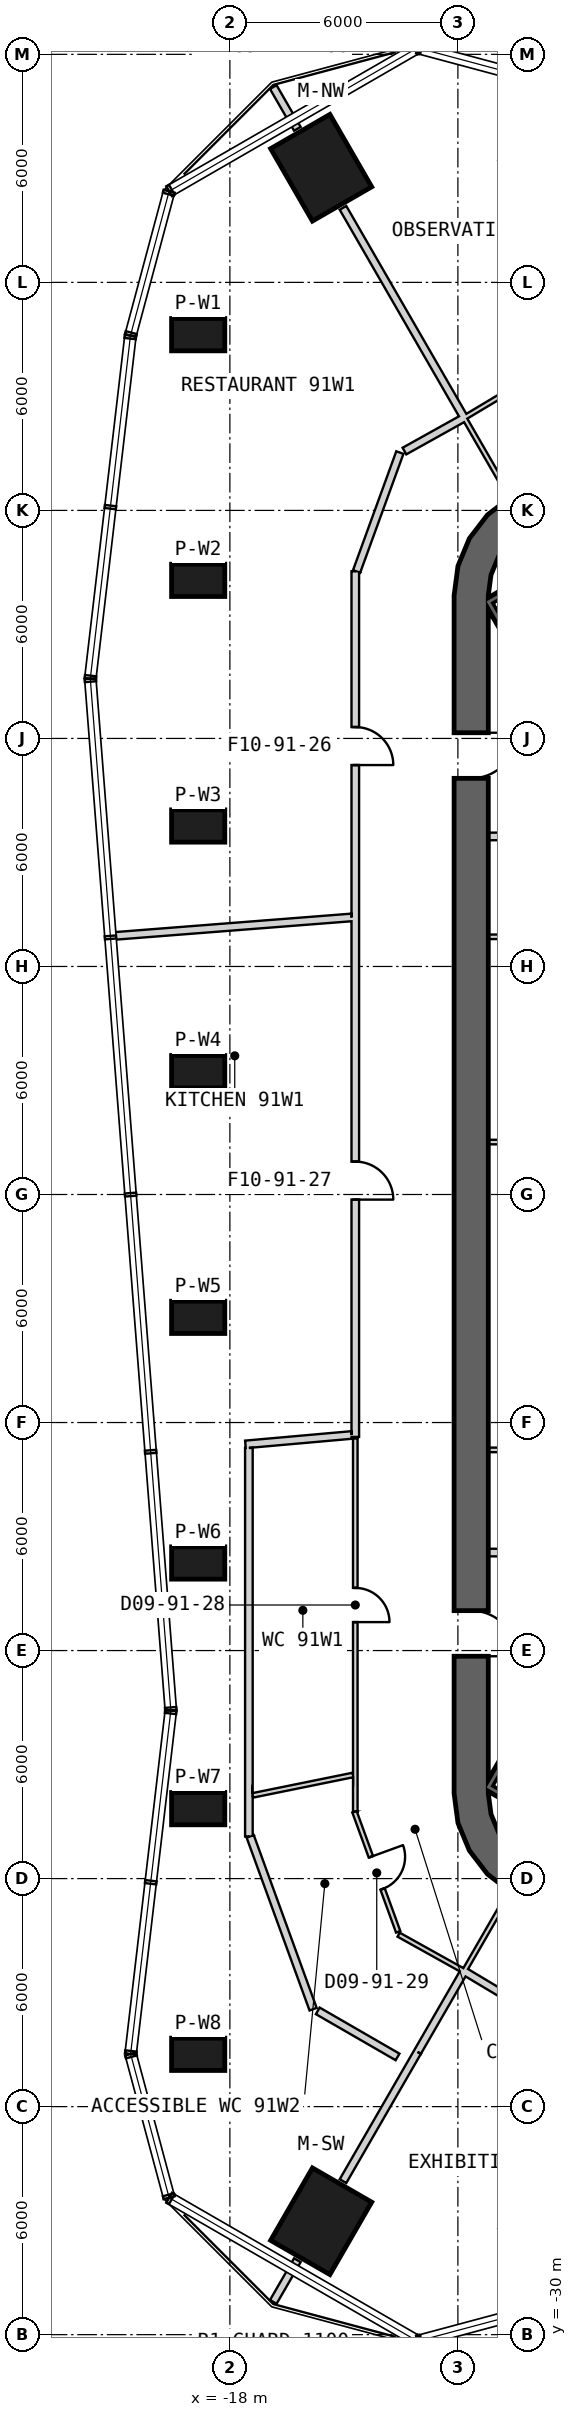
"""IFC4 building model, lengths in metres.
Left out: names, types, materials, properties, quantities, classifications, styles, units other than length and angle.
Written with IfcOpenShell. Run it as: python <this file> out.ifc"""

import sys

from ifc_helpers import new_model, si_unit, direction, frame, frame_2d, origin, origin_2d, place, context, subcontext, project, spatial, polyline, rectangle, outline, extrude, element, fill, save


model = new_model("IFC4")
c1 = context("Model", 3, precision=1e-05, world=origin(), true_north=direction((0.0, 1.0)))
c2 = subcontext(c1, "Body", "Model", "MODEL_VIEW")
j1 = project(units=[si_unit("LENGTHUNIT", "METRE"), si_unit("PLANEANGLEUNIT", "RADIAN")], contexts=[c1])
p1 = place(None, origin())
s1 = spatial("IfcSite", under=j1, at=p1, CompositionType="ELEMENT")
p2 = place(p1, origin())
s2 = spatial("IfcBuilding", under=s1, at=p2, CompositionType="ELEMENT")
p3 = place(p2, frame((0.0, 0.0, 398.3)))
s3 = spatial("IfcBuildingStorey", under=s2, at=p3, CompositionType="ELEMENT", Elevation=398.3)
for number, where, z_axis, x_axis in (
    (1, (-15.598, 27.016, 0.0), (0.0, 0.0, 1.0), (-0.5, 0.866, 0.0)),
    (2, (-15.598, -27.016, 0.0), (0.0, 0.0, 1.0), (-0.5, -0.866, 0.0)),
):
    element("IfcColumn", number, at=place(p3, frame(where, z_axis=z_axis, x_axis=x_axis)), inside=s3, PredefinedType="COLUMN", context=c2, shape_type="SweptSolid", body=[
        extrude(rectangle(XDim=2.2, YDim=1.8, at=origin_2d()), origin(), (0.0, 0.0, 1.0), 6.5),
    ])
for number, where, z_axis, x_axis in (
    (3, (-18.834, 22.624, 0.0), (0.0, 0.0, 1.0), (-1.0, 0.0, 0.0)),
    (4, (-18.834, 16.16, 0.0), (0.0, 0.0, 1.0), (-1.0, 0.0, 0.0)),
):
    element("IfcColumn", number, at=place(p3, frame(where, z_axis=z_axis, x_axis=x_axis)), inside=s3, PredefinedType="COLUMN", context=c2, shape_type="SweptSolid", body=[
        extrude(rectangle(XDim=1.4, YDim=0.85, at=origin_2d()), origin(), (0.0, 0.0, 1.0), 6.5),
    ])
for number, where, z_axis, x_axis in (
    (5, (-18.834, 9.696, -0.3), (0.0, 0.0, 1.0), (-1.0, 0.0, 0.0)),
    (6, (-18.834, 3.232, -0.3), (0.0, 0.0, 1.0), (-1.0, 0.0, 0.0)),
    (7, (-18.834, -3.232, -0.3), (0.0, 0.0, 1.0), (-1.0, 0.0, 0.0)),
    (8, (-18.834, -9.696, -0.3), (0.0, 0.0, 1.0), (-1.0, 0.0, 0.0)),
):
    element("IfcColumn", number, at=place(p3, frame(where, z_axis=z_axis, x_axis=x_axis)), inside=s3, PredefinedType="COLUMN", context=c2, shape_type="SweptSolid", body=[
        extrude(rectangle(XDim=1.4, YDim=0.85, at=origin_2d()), origin(), (0.0, 0.0, 1.0), 6.8),
    ])
for number, where, z_axis, x_axis in (
    (9, (-18.834, -16.16, 0.0), (0.0, 0.0, 1.0), (-1.0, 0.0, 0.0)),
    (10, (-18.834, -22.624, 0.0), (0.0, 0.0, 1.0), (-1.0, 0.0, 0.0)),
):
    element("IfcColumn", number, at=place(p3, frame(where, z_axis=z_axis, x_axis=x_axis)), inside=s3, PredefinedType="COLUMN", context=c2, shape_type="SweptSolid", body=[
        extrude(rectangle(XDim=1.4, YDim=0.85, at=origin_2d()), origin(), (0.0, 0.0, 1.0), 6.5),
    ])
p4 = place(p3, frame((-11.65, 15.762, 0.0), z_axis=(0.0, 0.0, 1.0), x_axis=(0.0, -1.0, 0.0)))
e11 = element("IfcWall", 11, at=p4, inside=s3, PredefinedType="SHEAR", context=c2, shape_type="SweptSolid", body=[
    extrude(rectangle(XDim=31.523, YDim=0.9, at=frame_2d((15.762, 0.0))), origin(), (0.0, 0.0, 1.0), 6.5),
])
p5 = place(p4, frame((3.612, 0.0, 0.0)))
e12 = element("IfcOpeningElement", 12, at=p5, cuts=e11, PredefinedType="OPENING", context=c2, shape_type="SweptSolid", body=[
    extrude(rectangle(XDim=1.2, YDim=2.4, at=frame_2d((0.6, 1.2))), frame((0.0, 0.46, 0.0), z_axis=(0.0, -1.0, 0.0), x_axis=(1.0, 0.0, 0.0)), (0.0, 0.0, 1.0), 0.92),
])
p6 = place(p4, frame((26.712, 0.0, 0.0)))
e13 = element("IfcOpeningElement", 13, at=p6, cuts=e11, PredefinedType="OPENING", context=c2, shape_type="SweptSolid", body=[
    extrude(rectangle(XDim=1.2, YDim=2.4, at=frame_2d((0.6, 1.2))), frame((0.0, 0.46, 0.0), z_axis=(0.0, -1.0, 0.0), x_axis=(1.0, 0.0, 0.0)), (0.0, 0.0, 1.0), 0.92),
])
p7 = place(p3, origin())
e14 = element("IfcWall", 14, at=p7, inside=s3, PredefinedType="SHEAR", context=c2, shape_type="SweptSolid", body=[
    extrude(outline(polyline([(-7.6, 18.36), (-8.323, 18.659), (-9.1, 18.762), (-9.876, 18.659), (-10.6, 18.36), (-11.221, 17.883), (-11.698, 17.262), (-11.998, 16.538), (-12.1, 15.762), (-11.2, 15.762), (-11.128, 16.305), (-10.919, 16.812), (-10.585, 17.247), (-10.15, 17.58), (-9.644, 17.79), (-9.1, 17.862), (-8.556, 17.79), (-8.05, 17.58), (-7.6, 18.36)])), origin(), (0.0, 0.0, 1.0), 6.5),
])
p8 = place(p3, origin())
e15 = element("IfcWall", 15, at=p8, inside=s3, PredefinedType="SHEAR", context=c2, shape_type="SweptSolid", body=[
    extrude(outline(polyline([(-12.1, -15.762), (-11.998, -16.538), (-11.698, -17.262), (-11.221, -17.883), (-10.6, -18.36), (-9.876, -18.659), (-9.1, -18.762), (-8.323, -18.659), (-7.6, -18.36), (-8.05, -17.58), (-8.556, -17.79), (-9.1, -17.862), (-9.644, -17.79), (-10.15, -17.58), (-10.585, -17.247), (-10.919, -16.812), (-11.128, -16.305), (-11.2, -15.762), (-12.1, -15.762)])), origin(), (0.0, 0.0, 1.0), 6.5),
])
p9 = place(p3, frame((-11.245, 15.678, -0.3), z_axis=(0.0, 0.0, 1.0), x_axis=(0.499977274689, -0.866038523851, 0.0)))
e16 = element("IfcWall", 16, at=p9, inside=s3, PredefinedType="SHEAR", context=c2, shape_type="SweptSolid", body=[
    extrude(rectangle(XDim=8.1, YDim=0.2, at=frame_2d((4.05, 0.0))), origin(), (0.0, 0.0, 1.0), 6.5),
])
for number, where, z_axis, x_axis in (
    (17, (-7.818, 17.541, -0.3), (0.0, 0.0, 1.0), (-0.866, -0.5, 0.0)),
    (18, (-11.282, -15.541, -0.3), (0.0, 0.0, 1.0), (0.866, -0.5, 0.0)),
):
    element("IfcWall", number, at=place(p3, frame(where, z_axis=z_axis, x_axis=x_axis)), inside=s3, PredefinedType="SHEAR", context=c2, shape_type="SweptSolid", body=[
        extrude(rectangle(XDim=3.8, YDim=0.2, at=frame_2d((1.9, 0.0))), origin(), (0.0, 0.0, 1.0), 6.5),
    ])
p10 = place(p3, frame((-7.196, -8.663, -0.3), z_axis=(0.0, 0.0, 1.0), x_axis=(-0.499997992926, -0.866026562566, 0.0)))
e19 = element("IfcWall", 19, at=p10, inside=s3, PredefinedType="SHEAR", context=c2, shape_type="SweptSolid", body=[
    extrude(rectangle(XDim=7.9, YDim=0.2, at=frame_2d((3.95, 0.0))), origin(), (0.0, 0.0, 1.0), 6.5),
])
p11 = place(p3, frame((-7.95, 6.78, 0.0), z_axis=(0.0, 0.0, 1.0), x_axis=(-1.0, 0.0, 0.0)))
e20 = element("IfcWall", 20, at=p11, inside=s3, PredefinedType="PARTITIONING", context=c2, shape_type="SweptSolid", body=[
    extrude(rectangle(XDim=3.25, YDim=0.12, at=frame_2d((1.625, 0.0))), origin(), (0.0, 0.0, 1.0), 6.2),
])
p12 = place(p11, frame((1.225, 0.0, 0.0)))
e21 = element("IfcOpeningElement", 21, at=p12, cuts=e20, PredefinedType="OPENING", context=c2, shape_type="SweptSolid", body=[
    extrude(rectangle(XDim=0.8, YDim=2.1, at=frame_2d((0.4, 1.05))), frame((0.0, 0.07, 0.0), z_axis=(0.0, -1.0, 0.0), x_axis=(1.0, 0.0, 0.0)), (0.0, 0.0, 1.0), 0.14),
])
p13 = place(p3, frame((-7.85, 9.451, 0.0), z_axis=(0.0, 0.0, 1.0), x_axis=(-0.999957167047, -0.009255488683, 0.0)))
e22 = element("IfcWall", 22, at=p13, inside=s3, PredefinedType="PARTITIONING", context=c2, shape_type="SweptSolid", body=[
    extrude(rectangle(XDim=3.35, YDim=0.2, at=frame_2d((1.675, 0.0))), origin(), (0.0, 0.0, 1.0), 6.2),
])
p14 = place(p13, frame((1.325, 0.0, 0.0)))
e23 = element("IfcOpeningElement", 23, at=p14, cuts=e22, PredefinedType="OPENING", context=c2, shape_type="SweptSolid", body=[
    extrude(rectangle(XDim=0.8, YDim=2.1, at=frame_2d((0.4, 1.05))), frame((0.0, 0.11, 0.0), z_axis=(0.0, -1.0, 0.0), x_axis=(1.0, 0.0, 0.0)), (0.0, 0.0, 1.0), 0.22),
])
p15 = place(p3, frame((-7.95, 1.38, 0.0), z_axis=(0.0, 0.0, 1.0), x_axis=(-1.0, 0.0, 0.0)))
e24 = element("IfcWall", 24, at=p15, inside=s3, PredefinedType="PARTITIONING", context=c2, shape_type="SweptSolid", body=[
    extrude(rectangle(XDim=3.25, YDim=0.12, at=frame_2d((1.625, 0.0))), origin(), (0.0, 0.0, 1.0), 6.2),
])
p16 = place(p3, frame((-11.2, -6.72, 0.0), z_axis=(0.0, 0.0, 1.0), x_axis=(1.0, 0.0, 0.0)))
e25 = element("IfcWall", 25, at=p16, inside=s3, PredefinedType="PARTITIONING", context=c2, shape_type="SweptSolid", body=[
    extrude(rectangle(XDim=3.25, YDim=0.12, at=frame_2d((1.625, 0.0))), origin(), (0.0, 0.0, 1.0), 6.2),
])
p17 = place(p16, frame((1.225, 0.0, 0.0)))
e26 = element("IfcOpeningElement", 26, at=p17, cuts=e25, PredefinedType="OPENING", context=c2, shape_type="SweptSolid", body=[
    extrude(rectangle(XDim=0.8, YDim=2.1, at=frame_2d((0.4, 1.05))), frame((0.0, 0.07, 0.0), z_axis=(0.0, -1.0, 0.0), x_axis=(1.0, 0.0, 0.0)), (0.0, 0.0, 1.0), 0.14),
])
p18 = place(p3, frame((-11.2, -9.42, 0.0), z_axis=(0.0, 0.0, 1.0), x_axis=(0.999957467379, -0.009222983926, 0.0)))
e27 = element("IfcWall", 27, at=p18, inside=s3, PredefinedType="PARTITIONING", context=c2, shape_type="SweptSolid", body=[
    extrude(rectangle(XDim=3.15, YDim=0.2, at=frame_2d((1.575, 0.0))), origin(), (0.0, 0.0, 1.0), 6.2),
])
p19 = place(p18, frame((1.175, 0.0, 0.0)))
e28 = element("IfcOpeningElement", 28, at=p19, cuts=e27, PredefinedType="OPENING", context=c2, shape_type="SweptSolid", body=[
    extrude(rectangle(XDim=0.8, YDim=2.1, at=frame_2d((0.4, 1.05))), frame((0.0, 0.11, 0.0), z_axis=(0.0, -1.0, 0.0), x_axis=(1.0, 0.0, 0.0)), (0.0, 0.0, 1.0), 0.22),
])
p20 = place(p3, frame((-14.7, 16.399, 0.0), z_axis=(0.0, 0.0, 1.0), x_axis=(0.0, -1.0, 0.0)))
e29 = element("IfcWall", 29, at=p20, inside=s3, PredefinedType="PARTITIONING", context=c2, shape_type="SweptSolid", body=[
    extrude(rectangle(XDim=9.078, YDim=0.2, at=frame_2d((4.539, 0.0))), origin(), (0.0, 0.0, 1.0), 5.57),
])
p21 = place(p20, frame((4.1, 0.0, 0.0)))
e30 = element("IfcOpeningElement", 30, at=p21, cuts=e29, PredefinedType="OPENING", context=c2, shape_type="SweptSolid", body=[
    extrude(rectangle(XDim=1.0, YDim=2.1, at=frame_2d((0.5, 1.05))), frame((0.0, 0.11, 0.0), z_axis=(0.0, -1.0, 0.0), x_axis=(1.0, 0.0, 0.0)), (0.0, 0.0, 1.0), 0.22),
])
p22 = place(p3, frame((-14.7, 7.322, 0.0), z_axis=(0.0, 0.0, 1.0), x_axis=(0.0, -1.0, 0.0)))
e31 = element("IfcWall", 31, at=p22, inside=s3, PredefinedType="PARTITIONING", context=c2, shape_type="SweptSolid", body=[
    extrude(rectangle(XDim=13.701, YDim=0.2, at=frame_2d((6.851, 0.0))), origin(), (0.0, 0.0, 1.0), 5.67),
])
p23 = place(p22, frame((6.456, 0.0, 0.0)))
e32 = element("IfcOpeningElement", 32, at=p23, cuts=e31, PredefinedType="OPENING", context=c2, shape_type="SweptSolid", body=[
    extrude(rectangle(XDim=1.0, YDim=2.1, at=frame_2d((0.5, 1.05))), frame((0.0, 0.11, 0.0), z_axis=(0.0, -1.0, 0.0), x_axis=(1.0, 0.0, 0.0)), (0.0, 0.0, 1.0), 0.22),
])
p24 = place(p3, frame((-13.527, 19.522, 0.0), z_axis=(0.0, 0.0, 1.0), x_axis=(-0.341978542333, -0.939707761266, 0.0)))
e33 = element("IfcWall", 33, at=p24, inside=s3, PredefinedType="PARTITIONING", context=c2, shape_type="SweptSolid", body=[
    extrude(rectangle(XDim=3.33, YDim=0.2, at=frame_2d((1.665, 0.0))), origin(), (0.0, 0.0, 1.0), 5.57),
])
p25 = place(p3, frame((-11.808, 20.452, 0.0), z_axis=(0.0, 0.0, 1.0), x_axis=(-0.873514477635, -0.486798169021, 0.0)))
e34 = element("IfcWall", 34, at=p25, inside=s3, PredefinedType="PARTITIONING", context=c2, shape_type="SweptSolid", body=[
    extrude(rectangle(XDim=1.83, YDim=0.2, at=frame_2d((0.915, 0.0))), origin(), (0.0, 0.0, 1.0), 5.57),
])
p26 = place(p3, frame((-14.7, -6.419, 0.0), z_axis=(0.0, 0.0, 1.0), x_axis=(0.0, -1.0, 0.0)))
e35 = element("IfcWall", 35, at=p26, inside=s3, PredefinedType="PARTITIONING", context=c2, shape_type="SweptSolid", body=[
    extrude(rectangle(XDim=8.835, YDim=0.12, at=frame_2d((4.418, 0.0))), origin(), (0.0, 0.0, 1.0), 5.57),
])
p27 = place(p26, frame((3.932, 0.0, 0.0)))
e36 = element("IfcOpeningElement", 36, at=p27, cuts=e35, PredefinedType="OPENING", context=c2, shape_type="SweptSolid", body=[
    extrude(rectangle(XDim=0.9, YDim=2.1, at=frame_2d((0.45, 1.05))), frame((0.0, 0.07, 0.0), z_axis=(0.0, -1.0, 0.0), x_axis=(1.0, 0.0, 0.0)), (0.0, 0.0, 1.0), 0.14),
])
p28 = place(p3, frame((-14.7, -15.255, 0.0), z_axis=(0.0, 0.0, 1.0), x_axis=(0.0, -1.0, 0.0)))
e37 = element("IfcWall", 37, at=p28, inside=s3, PredefinedType="PARTITIONING", context=c2, shape_type="SweptSolid", body=[
    extrude(rectangle(XDim=0.985, YDim=0.12, at=frame_2d((0.492, 0.0))), origin(), (0.0, 0.0, 1.0), 6.2),
])
p29 = place(p3, frame((-13.559, -19.476, 0.0), z_axis=(0.0, 0.0, 1.0), x_axis=(0.873536168316, -0.486759245052, 0.0)))
e38 = element("IfcWall", 38, at=p29, inside=s3, PredefinedType="PARTITIONING", context=c2, shape_type="SweptSolid", body=[
    extrude(rectangle(XDim=2.005, YDim=0.12, at=frame_2d((1.002, 0.0))), origin(), (0.0, 0.0, 1.0), 5.57),
])
p30 = place(p3, frame((-14.72, -16.243, 0.0), z_axis=(0.0, 0.0, 1.0), x_axis=(0.342046381322, -0.939683070521, 0.0)))
e39 = element("IfcWall", 39, at=p30, inside=s3, PredefinedType="PARTITIONING", context=c2, shape_type="SweptSolid", body=[
    extrude(rectangle(XDim=3.36, YDim=0.12, at=frame_2d((1.68, 0.0))), origin(), (0.0, 0.0, 1.0), 5.57),
])
p31 = place(p30, frame((1.26, 0.0, 0.0)))
e40 = element("IfcOpeningElement", 40, at=p31, cuts=e39, PredefinedType="OPENING", context=c2, shape_type="SweptSolid", body=[
    extrude(rectangle(XDim=0.9, YDim=2.1, at=frame_2d((0.45, 1.05))), frame((0.0, 0.07, 0.0), z_axis=(0.0, -1.0, 0.0), x_axis=(1.0, 0.0, 0.0)), (0.0, 0.0, 1.0), 0.14),
])
for number, where, z_axis, x_axis in (
    (41, (-11.849, 20.463, 0.0), (0.0, 0.0, 1.0), (0.5, -0.866, 0.0)),
    (42, (-10.549, -18.212, 0.0), (0.0, 0.0, 1.0), (-0.5, -0.866, 0.0)),
):
    element("IfcWall", number, at=place(p3, frame(where, z_axis=z_axis, x_axis=x_axis)), inside=s3, PredefinedType="PARTITIONING", context=c2, shape_type="SweptSolid", body=[
        extrude(rectangle(XDim=2.6, YDim=0.12, at=frame_2d((1.3, 0.0))), origin(), (0.0, 0.0, 1.0), 5.57),
    ])
p32 = place(p3, frame((-14.8, 7.29, 0.0), z_axis=(0.0, 0.0, 1.0), x_axis=(-0.996965352489, -0.077846553789, 0.0)))
e43 = element("IfcWall", 43, at=p32, inside=s3, PredefinedType="PARTITIONING", context=c2, shape_type="SweptSolid", body=[
    extrude(rectangle(XDim=6.363, YDim=0.2, at=frame_2d((3.182, 0.0))), origin(), (0.0, 0.0, 1.0), 6.2),
])
p33 = place(p3, frame((-16.858, 29.138, 0.0), z_axis=(0.0, 0.0, 1.0), x_axis=(0.499950289094, -0.866054102487, 0.0)))
e44 = element("IfcWall", 44, at=p33, inside=s3, PredefinedType="PARTITIONING", context=c2, shape_type="SweptSolid", body=[
    extrude(rectangle(XDim=1.268, YDim=0.2, at=frame_2d((0.634, 0.0))), origin(), (0.0, 0.0, 1.0), 6.2),
])
p34 = place(p3, frame((-15.024, 25.962, 0.0), z_axis=(0.0, 0.0, 1.0), x_axis=(0.499993152284, -0.866029357279, 0.0)))
e45 = element("IfcWall", 45, at=p34, inside=s3, PredefinedType="PARTITIONING", context=c2, shape_type="SweptSolid", body=[
    extrude(rectangle(XDim=6.35, YDim=0.2, at=frame_2d((3.175, 0.0))), origin(), (0.0, 0.0, 1.0), 5.57),
])
p35 = place(p3, frame((-14.8, -6.328, 0.0), z_axis=(0.0, 0.0, 1.0), x_axis=(-0.996081685844, -0.088437973332, 0.0)))
e46 = element("IfcWall", 46, at=p35, inside=s3, PredefinedType="PARTITIONING", context=c2, shape_type="SweptSolid", body=[
    extrude(rectangle(XDim=2.802, YDim=0.2, at=frame_2d((1.401, 0.0))), origin(), (0.0, 0.0, 1.0), 6.2),
])
p36 = place(p3, frame((-17.5, -16.893, 0.0), z_axis=(0.0, 0.0, 1.0), x_axis=(0.0, 1.0, 0.0)))
e47 = element("IfcWall", 47, at=p36, inside=s3, PredefinedType="PARTITIONING", context=c2, shape_type="SweptSolid", body=[
    extrude(rectangle(XDim=1.052, YDim=0.2, at=frame_2d((0.526, 0.0))), origin(), (0.0, 0.0, 1.0), 6.2),
])
p37 = place(p3, frame((-17.5, -15.841, 0.0), z_axis=(0.0, 0.0, 1.0), x_axis=(0.0, 1.0, 0.0)))
e48 = element("IfcWall", 48, at=p37, inside=s3, PredefinedType="PARTITIONING", context=c2, shape_type="SweptSolid", body=[
    extrude(rectangle(XDim=9.173, YDim=0.2, at=frame_2d((4.586, 0.0))), origin(), (0.0, 0.0, 1.0), 5.57),
])
p38 = place(p3, frame((-17.466, -16.887, 0.0), z_axis=(0.0, 0.0, 1.0), x_axis=(0.342054816013, -0.939680000235, 0.0)))
e49 = element("IfcWall", 49, at=p38, inside=s3, PredefinedType="PARTITIONING", context=c2, shape_type="SweptSolid", body=[
    extrude(rectangle(XDim=4.841, YDim=0.2, at=frame_2d((2.421, 0.0))), origin(), (0.0, 0.0, 1.0), 5.57),
])
p39 = place(p3, frame((-15.688, -21.48, 0.0), z_axis=(0.0, 0.0, 1.0), x_axis=(0.866041403502, -0.499972286653, 0.0)))
e50 = element("IfcWall", 50, at=p39, inside=s3, PredefinedType="PARTITIONING", context=c2, shape_type="SweptSolid", body=[
    extrude(rectangle(XDim=2.425, YDim=0.2, at=frame_2d((1.212, 0.0))), origin(), (0.0, 0.0, 1.0), 6.2),
])
p40 = place(p3, frame((-16.858, -29.138, 0.0), z_axis=(0.0, 0.0, 1.0), x_axis=(0.499950289094, 0.866054102487, 0.0)))
e51 = element("IfcWall", 51, at=p40, inside=s3, PredefinedType="PARTITIONING", context=c2, shape_type="SweptSolid", body=[
    extrude(rectangle(XDim=1.268, YDim=0.2, at=frame_2d((0.634, 0.0))), origin(), (0.0, 0.0, 1.0), 6.2),
])
p41 = place(p3, frame((-15.024, -25.962, 0.0), z_axis=(0.0, 0.0, 1.0), x_axis=(0.500004108169, 0.866023031919, 0.0)))
e52 = element("IfcWall", 52, at=p41, inside=s3, PredefinedType="PARTITIONING", context=c2, shape_type="SweptSolid", body=[
    extrude(rectangle(XDim=3.927, YDim=0.2, at=frame_2d((1.963, 0.0))), origin(), (0.0, 0.0, 1.0), 5.57),
])
p42 = place(p3, frame((-17.4, -15.811, 0.0), z_axis=(0.0, 0.0, 1.0), x_axis=(0.979941162084, 0.199287026304, 0.0)))
e53 = element("IfcWall", 53, at=p42, inside=s3, PredefinedType="PARTITIONING", context=c2, shape_type="SweptSolid", body=[
    extrude(rectangle(XDim=2.694, YDim=0.12, at=frame_2d((1.347, 0.0))), origin(), (0.0, 0.0, 1.0), 6.2),
])
p43 = place(p3, frame((-11.849, -20.463, 0.0), z_axis=(0.0, 0.0, 1.0), x_axis=(-0.49997539674, -0.866039608017, 0.0)))
e54 = element("IfcWall", 54, at=p43, inside=s3, PredefinedType="PARTITIONING", context=c2, shape_type="SweptSolid", body=[
    extrude(rectangle(XDim=2.423, YDim=0.2, at=frame_2d((1.211, 0.0))), origin(), (0.0, 0.0, 1.0), 5.57),
])
p44 = place(p3, frame((-10.087, 21.481, 0.0), z_axis=(0.0, 0.0, 1.0), x_axis=(-0.858372726575, -0.513026570728, 0.0)))
e55 = element("IfcWall", 55, at=p44, inside=s3, PredefinedType="PARTITIONING", context=c2, shape_type="SweptSolid", body=[
    extrude(rectangle(XDim=2.005, YDim=0.12, at=frame_2d((1.002, 0.0))), origin(), (0.0, 0.0, 1.0), 5.57),
])
p45 = place(p3, frame((-11.808, -20.452, 0.0), z_axis=(0.0, 0.0, 1.0), x_axis=(0.858362923554, -0.51304297234, 0.0)))
e56 = element("IfcWall", 56, at=p45, inside=s3, PredefinedType="PARTITIONING", context=c2, shape_type="SweptSolid", body=[
    extrude(rectangle(XDim=1.83, YDim=0.2, at=frame_2d((0.915, 0.0))), origin(), (0.0, 0.0, 1.0), 5.57),
])
p46 = place(p21, origin())
e57 = element("IfcDoor", 57, at=p46, inside=s3, OperationType="SINGLE_SWING_RIGHT", PredefinedType="USERDEFINED", context=c2, shape_type="SweptSolid", body=[
    extrude(rectangle(XDim=1.0, YDim=2.1, at=frame_2d((0.5, 1.05))), frame((0.0, 0.025, 0.0), z_axis=(0.0, -1.0, 0.0), x_axis=(1.0, 0.0, 0.0)), (0.0, 0.0, 1.0), 0.05),
])
fill(e30, e57)
p47 = place(p23, origin())
e58 = element("IfcDoor", 58, at=p47, inside=s3, OperationType="SINGLE_SWING_RIGHT", PredefinedType="USERDEFINED", context=c2, shape_type="SweptSolid", body=[
    extrude(rectangle(XDim=1.0, YDim=2.1, at=frame_2d((0.5, 1.05))), frame((0.0, 0.025, 0.0), z_axis=(0.0, -1.0, 0.0), x_axis=(1.0, 0.0, 0.0)), (0.0, 0.0, 1.0), 0.05),
])
fill(e32, e58)
p48 = place(p27, origin())
e59 = element("IfcDoor", 59, at=p48, inside=s3, OperationType="SINGLE_SWING_RIGHT", PredefinedType="NOTDEFINED", context=c2, shape_type="SweptSolid", body=[
    extrude(rectangle(XDim=0.9, YDim=2.1, at=frame_2d((0.45, 1.05))), frame((0.0, 0.025, 0.0), z_axis=(0.0, -1.0, 0.0), x_axis=(1.0, 0.0, 0.0)), (0.0, 0.0, 1.0), 0.05),
])
fill(e36, e59)
p49 = place(p31, origin())
e60 = element("IfcDoor", 60, at=p49, inside=s3, OperationType="SINGLE_SWING_LEFT", PredefinedType="NOTDEFINED", context=c2, shape_type="SweptSolid", body=[
    extrude(rectangle(XDim=0.9, YDim=2.1, at=frame_2d((0.45, 1.05))), frame((0.0, 0.025, 0.0), z_axis=(0.0, -1.0, 0.0), x_axis=(1.0, 0.0, 0.0)), (0.0, 0.0, 1.0), 0.05),
])
fill(e40, e60)
p50 = place(p5, origin())
e61 = element("IfcDoor", 61, at=p50, inside=s3, OperationType="SINGLE_SWING_LEFT", PredefinedType="USERDEFINED", context=c2, shape_type="SweptSolid", body=[
    extrude(rectangle(XDim=1.2, YDim=2.4, at=frame_2d((0.6, 1.2))), frame((0.0, 0.025, 0.0), z_axis=(0.0, -1.0, 0.0), x_axis=(1.0, 0.0, 0.0)), (0.0, 0.0, 1.0), 0.05),
])
fill(e12, e61)
p51 = place(p6, origin())
e62 = element("IfcDoor", 62, at=p51, inside=s3, OperationType="SINGLE_SWING_RIGHT", PredefinedType="USERDEFINED", context=c2, shape_type="SweptSolid", body=[
    extrude(rectangle(XDim=1.2, YDim=2.4, at=frame_2d((0.6, 1.2))), frame((0.0, 0.025, 0.0), z_axis=(0.0, -1.0, 0.0), x_axis=(1.0, 0.0, 0.0)), (0.0, 0.0, 1.0), 0.05),
])
fill(e13, e62)
save(model, sys.argv[1])
